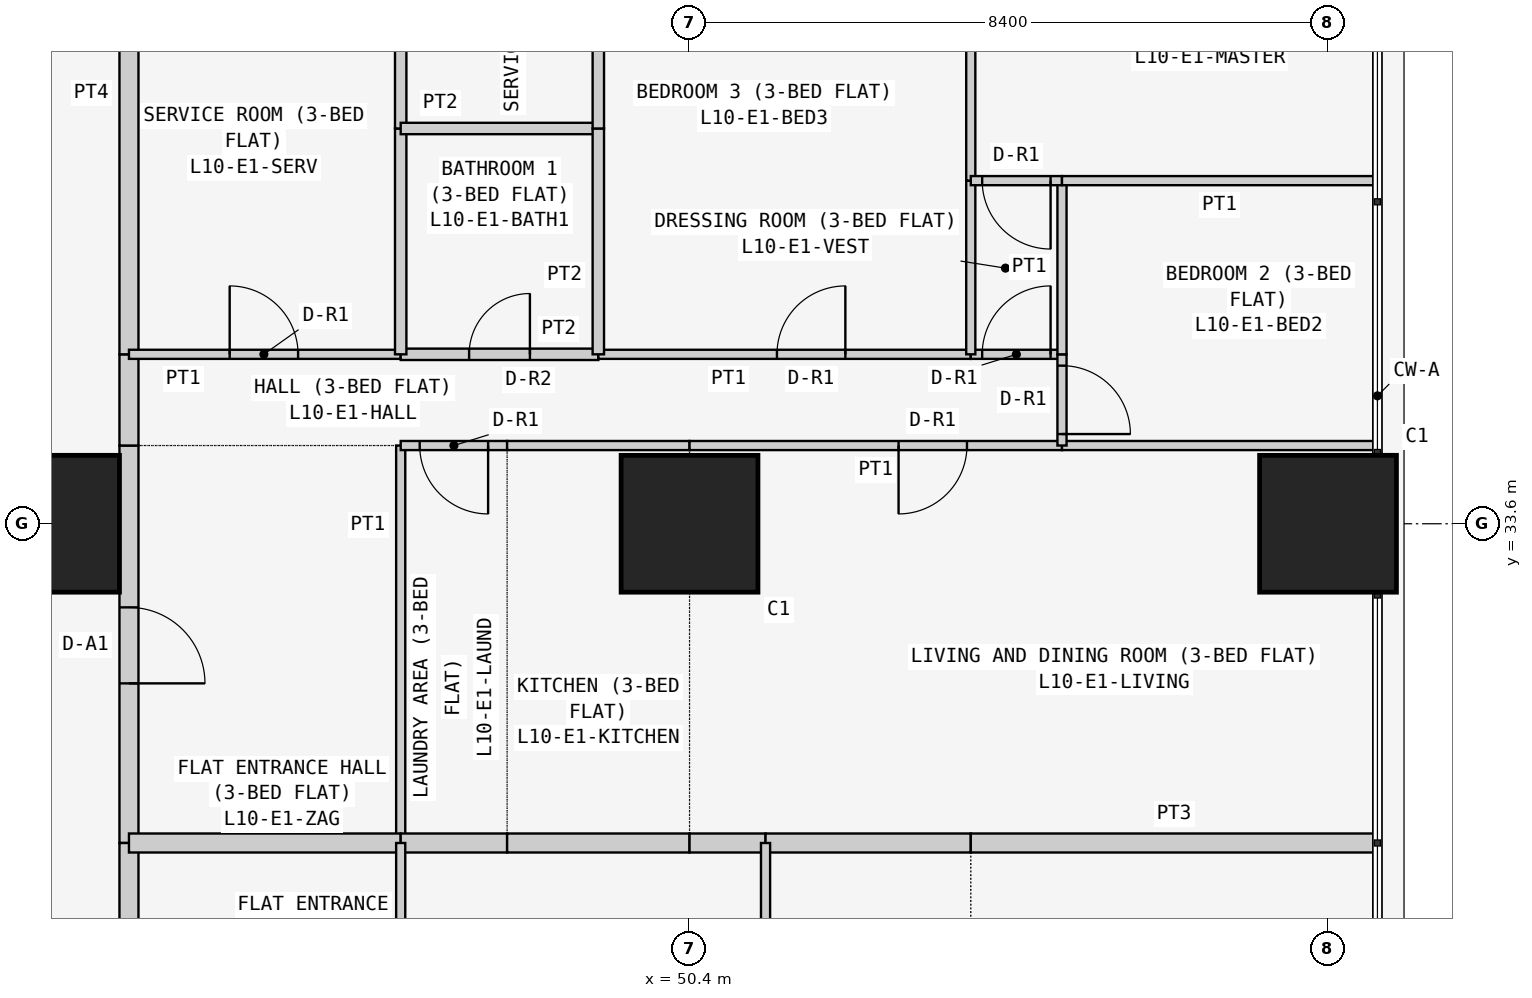
"""IFC4 building model, lengths in metres.
Left out: names, types, materials, properties, quantities, classifications, styles, units other than length and angle.
Written with IfcOpenShell. Run it as: python <this file> out.ifc"""

import sys

from ifc_helpers import new_model, si_unit, direction, frame, frame_2d, origin, origin_2d, place, context, subcontext, project, spatial, rectangle, extrude, element, fill, save


model = new_model("IFC4")
c1 = context("Model", 3, precision=1e-05, world=origin(), true_north=direction((0.0, 1.0)))
c2 = subcontext(c1, "Body", "Model", "MODEL_VIEW")
j1 = project(units=[si_unit("LENGTHUNIT", "METRE"), si_unit("PLANEANGLEUNIT", "RADIAN")], contexts=[c1])
p1 = place(None, origin())
s1 = spatial("IfcSite", under=j1, at=p1, CompositionType="ELEMENT")
p2 = place(p1, origin())
s2 = spatial("IfcBuilding", under=s1, at=p2, CompositionType="ELEMENT")
p3 = place(p2, frame((0.0, 0.0, 45.3)))
s3 = spatial("IfcBuildingStorey", under=s2, at=p3, CompositionType="ELEMENT", Elevation=45.3)
for number, where, z_axis, x_axis in (
    (1, (42.0, 33.6, 0.0), (0.0, 0.0, 1.0), (1.0, 0.0, 0.0)),
    (2, (50.4, 33.6, 0.0), (0.0, 0.0, 1.0), (1.0, 0.0, 0.0)),
    (3, (58.8, 33.6, 0.0), (0.0, 0.0, 1.0), (1.0, 0.0, 0.0)),
):
    element("IfcColumn", number, at=place(p3, frame(where, z_axis=z_axis, x_axis=x_axis)), inside=s3, PredefinedType="COLUMN", context=c2, shape_type="SweptSolid", body=[
        extrude(rectangle(XDim=1.8, YDim=1.8, at=origin_2d()), origin(), (0.0, 0.0, 1.0), 3.6),
    ])
p4 = place(p3, frame((43.025, 34.629, 0.0), z_axis=(0.0, 0.0, 1.0), x_axis=(0.0, -1.0, 0.0)))
e4 = element("IfcWall", 4, at=p4, inside=s3, PredefinedType="PARTITIONING", context=c2, shape_type="SweptSolid", body=[
    extrude(rectangle(XDim=5.229, YDim=0.25, at=frame_2d((2.615, 0.0))), origin(), (0.0, 0.0, 1.0), 3.45),
])
p5 = place(p4, frame((2.129, 0.0, 0.0)))
e5 = element("IfcOpeningElement", 5, at=p5, cuts=e4, PredefinedType="OPENING", context=c2, shape_type="SweptSolid", body=[
    extrude(rectangle(XDim=1.0, YDim=2.1, at=frame_2d((0.5, 1.05))), frame((0.0, 0.135, 0.0), z_axis=(0.0, -1.0, 0.0), x_axis=(1.0, 0.0, 0.0)), (0.0, 0.0, 1.0), 0.27),
])
p6 = place(p3, frame((43.025, 35.829, 0.0), z_axis=(0.0, 0.0, 1.0), x_axis=(0.0, -1.0, 0.0)))
e6 = element("IfcWall", 6, at=p6, inside=s3, PredefinedType="PARTITIONING", context=c2, shape_type="SweptSolid", body=[
    extrude(rectangle(XDim=1.2, YDim=0.25, at=frame_2d((0.6, 0.0))), origin(), (0.0, 0.0, 1.0), 3.45),
])
p7 = place(p3, frame((43.025, 42.7, 0.0), z_axis=(0.0, 0.0, 1.0), x_axis=(0.0, -1.0, 0.0)))
e7 = element("IfcWall", 7, at=p7, inside=s3, PredefinedType="PARTITIONING", context=c2, shape_type="SweptSolid", body=[
    extrude(rectangle(XDim=6.871, YDim=0.25, at=frame_2d((3.436, 0.0))), origin(), (0.0, 0.0, 1.0), 3.45),
])
p8 = place(p3, frame((43.025, 29.4, 0.0), z_axis=(0.0, 0.0, 1.0), x_axis=(0.0, -1.0, 0.0)))
e8 = element("IfcWall", 8, at=p8, inside=s3, PredefinedType="PARTITIONING", context=c2, shape_type="SweptSolid", body=[
    extrude(rectangle(XDim=5.229, YDim=0.25, at=frame_2d((2.615, 0.0))), origin(), (0.0, 0.0, 1.0), 3.45),
])
p9 = place(p8, frame((2.1, 0.0, 0.0)))
e9 = element("IfcOpeningElement", 9, at=p9, cuts=e8, PredefinedType="OPENING", context=c2, shape_type="SweptSolid", body=[
    extrude(rectangle(XDim=1.0, YDim=2.1, at=frame_2d((0.5, 1.05))), frame((0.0, 0.135, 0.0), z_axis=(0.0, -1.0, 0.0), x_axis=(1.0, 0.0, 0.0)), (0.0, 0.0, 1.0), 0.27),
])
p10 = place(p3, frame((46.6, 29.4, 0.0), z_axis=(0.0, 0.0, 1.0), x_axis=(0.0, 1.0, 0.0)))
e10 = element("IfcWall", 10, at=p10, inside=s3, PredefinedType="PARTITIONING", context=c2, shape_type="SweptSolid", body=[
    extrude(rectangle(XDim=5.229, YDim=0.12, at=frame_2d((2.615, 0.0))), origin(), (0.0, 0.0, 1.0), 3.45),
])
p11 = place(p3, frame((43.025, 29.4, 0.0), z_axis=(0.0, 0.0, 1.0), x_axis=(1.0, 0.0, 0.0)))
e11 = element("IfcWall", 11, at=p11, inside=s3, PredefinedType="PARTITIONING", context=c2, shape_type="SweptSolid", body=[
    extrude(rectangle(XDim=3.575, YDim=0.25, at=frame_2d((1.788, 0.0))), origin(), (0.0, 0.0, 1.0), 3.45),
])
p12 = place(p3, frame((48.0, 34.629, 0.0), z_axis=(0.0, 0.0, 1.0), x_axis=(-1.0, 0.0, 0.0)))
e12 = element("IfcWall", 12, at=p12, inside=s3, PredefinedType="PARTITIONING", context=c2, shape_type="SweptSolid", body=[
    extrude(rectangle(XDim=1.4, YDim=0.12, at=frame_2d((0.7, 0.0))), origin(), (0.0, 0.0, 1.0), 3.45),
])
p13 = place(p12, frame((0.25, 0.0, 0.0)))
e13 = element("IfcOpeningElement", 13, at=p13, cuts=e12, PredefinedType="OPENING", context=c2, shape_type="SweptSolid", body=[
    extrude(rectangle(XDim=0.9, YDim=2.1, at=frame_2d((0.45, 1.05))), frame((0.0, 0.07, 0.0), z_axis=(0.0, -1.0, 0.0), x_axis=(1.0, 0.0, 0.0)), (0.0, 0.0, 1.0), 0.14),
])
p14 = place(p3, frame((46.6, 29.4, 0.0), z_axis=(0.0, 0.0, 1.0), x_axis=(1.0, 0.0, 0.0)))
e14 = element("IfcWall", 14, at=p14, inside=s3, PredefinedType="PARTITIONING", context=c2, shape_type="SweptSolid", body=[
    extrude(rectangle(XDim=1.4, YDim=0.25, at=frame_2d((0.7, 0.0))), origin(), (0.0, 0.0, 1.0), 3.45),
])
p15 = place(p3, frame((50.4, 34.629, 0.0), z_axis=(0.0, 0.0, 1.0), x_axis=(-1.0, 0.0, 0.0)))
e15 = element("IfcWall", 15, at=p15, inside=s3, PredefinedType="PARTITIONING", context=c2, shape_type="SweptSolid", body=[
    extrude(rectangle(XDim=2.4, YDim=0.12, at=frame_2d((1.2, 0.0))), origin(), (0.0, 0.0, 1.0), 3.45),
])
p16 = place(p3, frame((48.0, 29.4, 0.0), z_axis=(0.0, 0.0, 1.0), x_axis=(1.0, 0.0, 0.0)))
e16 = element("IfcWall", 16, at=p16, inside=s3, PredefinedType="PARTITIONING", context=c2, shape_type="SweptSolid", body=[
    extrude(rectangle(XDim=2.4, YDim=0.25, at=frame_2d((1.2, 0.0))), origin(), (0.0, 0.0, 1.0), 3.45),
])
p17 = place(p3, frame((55.3, 34.629, 0.0), z_axis=(0.0, 0.0, 1.0), x_axis=(-1.0, 0.0, 0.0)))
e17 = element("IfcWall", 17, at=p17, inside=s3, PredefinedType="PARTITIONING", context=c2, shape_type="SweptSolid", body=[
    extrude(rectangle(XDim=4.9, YDim=0.12, at=frame_2d((2.45, 0.0))), origin(), (0.0, 0.0, 1.0), 3.45),
])
p18 = place(p17, frame((1.25, 0.0, 0.0)))
e18 = element("IfcOpeningElement", 18, at=p18, cuts=e17, PredefinedType="OPENING", context=c2, shape_type="SweptSolid", body=[
    extrude(rectangle(XDim=0.9, YDim=2.1, at=frame_2d((0.45, 1.05))), frame((0.0, 0.07, 0.0), z_axis=(0.0, -1.0, 0.0), x_axis=(1.0, 0.0, 0.0)), (0.0, 0.0, 1.0), 0.14),
])
p19 = place(p3, frame((59.45, 34.629, 0.0), z_axis=(0.0, 0.0, 1.0), x_axis=(-1.0, 0.0, 0.0)))
e19 = element("IfcWall", 19, at=p19, inside=s3, PredefinedType="PARTITIONING", context=c2, shape_type="SweptSolid", body=[
    extrude(rectangle(XDim=4.15, YDim=0.12, at=frame_2d((2.075, 0.0))), origin(), (0.0, 0.0, 1.0), 3.45),
])
p20 = place(p3, frame((50.4, 29.4, 0.0), z_axis=(0.0, 0.0, 1.0), x_axis=(1.0, 0.0, 0.0)))
e20 = element("IfcWall", 20, at=p20, inside=s3, PredefinedType="PARTITIONING", context=c2, shape_type="SweptSolid", body=[
    extrude(rectangle(XDim=1.0, YDim=0.25, at=frame_2d((0.5, 0.0))), origin(), (0.0, 0.0, 1.0), 3.45),
])
p21 = place(p3, frame((51.4, 29.4, 0.0), z_axis=(0.0, 0.0, 1.0), x_axis=(1.0, 0.0, 0.0)))
e21 = element("IfcWall", 21, at=p21, inside=s3, PredefinedType="PARTITIONING", context=c2, shape_type="SweptSolid", body=[
    extrude(rectangle(XDim=2.7, YDim=0.25, at=frame_2d((1.35, 0.0))), origin(), (0.0, 0.0, 1.0), 3.45),
])
p22 = place(p3, frame((54.1, 29.4, 0.0), z_axis=(0.0, 0.0, 1.0), x_axis=(1.0, 0.0, 0.0)))
e22 = element("IfcWall", 22, at=p22, inside=s3, PredefinedType="PARTITIONING", context=c2, shape_type="SweptSolid", body=[
    extrude(rectangle(XDim=5.35, YDim=0.25, at=frame_2d((2.675, 0.0))), origin(), (0.0, 0.0, 1.0), 3.45),
])
p23 = place(p3, frame((46.6, 35.829, 0.0), z_axis=(0.0, 0.0, 1.0), x_axis=(-1.0, 0.0, 0.0)))
e23 = element("IfcWall", 23, at=p23, inside=s3, PredefinedType="PARTITIONING", context=c2, shape_type="SweptSolid", body=[
    extrude(rectangle(XDim=3.575, YDim=0.12, at=frame_2d((1.788, 0.0))), origin(), (0.0, 0.0, 1.0), 3.45),
])
p24 = place(p23, frame((1.35, 0.0, 0.0)))
e24 = element("IfcOpeningElement", 24, at=p24, cuts=e23, PredefinedType="OPENING", context=c2, shape_type="SweptSolid", body=[
    extrude(rectangle(XDim=0.9, YDim=2.1, at=frame_2d((0.45, 1.05))), frame((0.0, 0.07, 0.0), z_axis=(0.0, -1.0, 0.0), x_axis=(1.0, 0.0, 0.0)), (0.0, 0.0, 1.0), 0.14),
])
p25 = place(p3, frame((49.2, 35.829, 0.0), z_axis=(0.0, 0.0, 1.0), x_axis=(-1.0, 0.0, 0.0)))
e25 = element("IfcWall", 25, at=p25, inside=s3, PredefinedType="PARTITIONING", context=c2, shape_type="SweptSolid", body=[
    extrude(rectangle(XDim=2.6, YDim=0.15, at=frame_2d((1.3, 0.0))), origin(), (0.0, 0.0, 1.0), 3.45),
])
p26 = place(p25, frame((0.9, 0.0, 0.0)))
e26 = element("IfcOpeningElement", 26, at=p26, cuts=e25, PredefinedType="OPENING", context=c2, shape_type="SweptSolid", body=[
    extrude(rectangle(XDim=0.8, YDim=2.1, at=frame_2d((0.4, 1.05))), frame((0.0, 0.085, 0.0), z_axis=(0.0, -1.0, 0.0), x_axis=(1.0, 0.0, 0.0)), (0.0, 0.0, 1.0), 0.17),
])
p27 = place(p3, frame((54.1, 35.829, 0.0), z_axis=(0.0, 0.0, 1.0), x_axis=(-1.0, 0.0, 0.0)))
e27 = element("IfcWall", 27, at=p27, inside=s3, PredefinedType="PARTITIONING", context=c2, shape_type="SweptSolid", body=[
    extrude(rectangle(XDim=4.9, YDim=0.12, at=frame_2d((2.45, 0.0))), origin(), (0.0, 0.0, 1.0), 3.45),
])
p28 = place(p27, frame((1.65, 0.0, 0.0)))
e28 = element("IfcOpeningElement", 28, at=p28, cuts=e27, PredefinedType="OPENING", context=c2, shape_type="SweptSolid", body=[
    extrude(rectangle(XDim=0.9, YDim=2.1, at=frame_2d((0.45, 1.05))), frame((0.0, 0.07, 0.0), z_axis=(0.0, -1.0, 0.0), x_axis=(1.0, 0.0, 0.0)), (0.0, 0.0, 1.0), 0.14),
])
p29 = place(p3, frame((55.3, 35.829, 0.0), z_axis=(0.0, 0.0, 1.0), x_axis=(-1.0, 0.0, 0.0)))
e29 = element("IfcWall", 29, at=p29, inside=s3, PredefinedType="PARTITIONING", context=c2, shape_type="SweptSolid", body=[
    extrude(rectangle(XDim=1.2, YDim=0.12, at=frame_2d((0.6, 0.0))), origin(), (0.0, 0.0, 1.0), 3.45),
])
p30 = place(p29, frame((0.15, 0.0, 0.0)))
e30 = element("IfcOpeningElement", 30, at=p30, cuts=e29, PredefinedType="OPENING", context=c2, shape_type="SweptSolid", body=[
    extrude(rectangle(XDim=0.9, YDim=2.1, at=frame_2d((0.45, 1.05))), frame((0.0, 0.07, 0.0), z_axis=(0.0, -1.0, 0.0), x_axis=(1.0, 0.0, 0.0)), (0.0, 0.0, 1.0), 0.14),
])
p31 = place(p3, frame((55.3, 34.629, 0.0), z_axis=(0.0, 0.0, 1.0), x_axis=(0.0, 1.0, 0.0)))
e31 = element("IfcWall", 31, at=p31, inside=s3, PredefinedType="PARTITIONING", context=c2, shape_type="SweptSolid", body=[
    extrude(rectangle(XDim=1.2, YDim=0.12, at=frame_2d((0.6, 0.0))), origin(), (0.0, 0.0, 1.0), 3.45),
])
p32 = place(p31, frame((0.151, 0.0, 0.0)))
e32 = element("IfcOpeningElement", 32, at=p32, cuts=e31, PredefinedType="OPENING", context=c2, shape_type="SweptSolid", body=[
    extrude(rectangle(XDim=0.9, YDim=2.1, at=frame_2d((0.45, 1.05))), frame((0.0, 0.07, 0.0), z_axis=(0.0, -1.0, 0.0), x_axis=(1.0, 0.0, 0.0)), (0.0, 0.0, 1.0), 0.14),
])
p33 = place(p3, frame((46.6, 35.829, 0.0), z_axis=(0.0, 0.0, 1.0), x_axis=(0.0, 1.0, 0.0)))
e33 = element("IfcWall", 33, at=p33, inside=s3, PredefinedType="PARTITIONING", context=c2, shape_type="SweptSolid", body=[
    extrude(rectangle(XDim=2.971, YDim=0.15, at=frame_2d((1.485, 0.0))), origin(), (0.0, 0.0, 1.0), 3.45),
])
p34 = place(p3, frame((46.6, 38.8, 0.0), z_axis=(0.0, 0.0, 1.0), x_axis=(0.0, 1.0, 0.0)))
e34 = element("IfcWall", 34, at=p34, inside=s3, PredefinedType="PARTITIONING", context=c2, shape_type="SweptSolid", body=[
    extrude(rectangle(XDim=3.9, YDim=0.15, at=frame_2d((1.95, 0.0))), origin(), (0.0, 0.0, 1.0), 3.45),
])
p35 = place(p34, frame((1.45, 0.0, 0.0)))
e35 = element("IfcOpeningElement", 35, at=p35, cuts=e34, PredefinedType="OPENING", context=c2, shape_type="SweptSolid", body=[
    extrude(rectangle(XDim=0.8, YDim=2.1, at=frame_2d((0.4, 1.05))), frame((0.0, 0.085, 0.0), z_axis=(0.0, -1.0, 0.0), x_axis=(1.0, 0.0, 0.0)), (0.0, 0.0, 1.0), 0.17),
])
p36 = place(p3, frame((49.2, 38.8, 0.0), z_axis=(0.0, 0.0, 1.0), x_axis=(-1.0, 0.0, 0.0)))
e36 = element("IfcWall", 36, at=p36, inside=s3, PredefinedType="PARTITIONING", context=c2, shape_type="SweptSolid", body=[
    extrude(rectangle(XDim=2.6, YDim=0.15, at=frame_2d((1.3, 0.0))), origin(), (0.0, 0.0, 1.0), 3.45),
])
p37 = place(p3, frame((49.2, 35.829, 0.0), z_axis=(0.0, 0.0, 1.0), x_axis=(0.0, 1.0, 0.0)))
e37 = element("IfcWall", 37, at=p37, inside=s3, PredefinedType="PARTITIONING", context=c2, shape_type="SweptSolid", body=[
    extrude(rectangle(XDim=2.971, YDim=0.15, at=frame_2d((1.485, 0.0))), origin(), (0.0, 0.0, 1.0), 3.45),
])
p38 = place(p3, frame((49.2, 38.8, 0.0), z_axis=(0.0, 0.0, 1.0), x_axis=(0.0, 1.0, 0.0)))
e38 = element("IfcWall", 38, at=p38, inside=s3, PredefinedType="PARTITIONING", context=c2, shape_type="SweptSolid", body=[
    extrude(rectangle(XDim=3.9, YDim=0.15, at=frame_2d((1.95, 0.0))), origin(), (0.0, 0.0, 1.0), 3.45),
])
p39 = place(p3, frame((54.1, 35.829, 0.0), z_axis=(0.0, 0.0, 1.0), x_axis=(0.0, 1.0, 0.0)))
e39 = element("IfcWall", 39, at=p39, inside=s3, PredefinedType="PARTITIONING", context=c2, shape_type="SweptSolid", body=[
    extrude(rectangle(XDim=2.285, YDim=0.12, at=frame_2d((1.143, 0.0))), origin(), (0.0, 0.0, 1.0), 3.45),
])
p40 = place(p3, frame((54.1, 38.114, 0.0), z_axis=(0.0, 0.0, 1.0), x_axis=(0.0, 1.0, 0.0)))
e40 = element("IfcWall", 40, at=p40, inside=s3, PredefinedType="PARTITIONING", context=c2, shape_type="SweptSolid", body=[
    extrude(rectangle(XDim=4.586, YDim=0.12, at=frame_2d((2.293, 0.0))), origin(), (0.0, 0.0, 1.0), 3.45),
])
p41 = place(p3, frame((55.3, 35.829, 0.0), z_axis=(0.0, 0.0, 1.0), x_axis=(0.0, 1.0, 0.0)))
e41 = element("IfcWall", 41, at=p41, inside=s3, PredefinedType="PARTITIONING", context=c2, shape_type="SweptSolid", body=[
    extrude(rectangle(XDim=2.285, YDim=0.12, at=frame_2d((1.143, 0.0))), origin(), (0.0, 0.0, 1.0), 3.45),
])
p42 = place(p3, frame((55.3, 38.114, 0.0), z_axis=(0.0, 0.0, 1.0), x_axis=(-1.0, 0.0, 0.0)))
e42 = element("IfcWall", 42, at=p42, inside=s3, PredefinedType="PARTITIONING", context=c2, shape_type="SweptSolid", body=[
    extrude(rectangle(XDim=1.2, YDim=0.12, at=frame_2d((0.6, 0.0))), origin(), (0.0, 0.0, 1.0), 3.45),
])
p43 = place(p42, frame((0.15, 0.0, 0.0)))
e43 = element("IfcOpeningElement", 43, at=p43, cuts=e42, PredefinedType="OPENING", context=c2, shape_type="SweptSolid", body=[
    extrude(rectangle(XDim=0.9, YDim=2.1, at=frame_2d((0.45, 1.05))), frame((0.0, 0.07, 0.0), z_axis=(0.0, -1.0, 0.0), x_axis=(1.0, 0.0, 0.0)), (0.0, 0.0, 1.0), 0.14),
])
p44 = place(p3, frame((59.45, 38.114, 0.0), z_axis=(0.0, 0.0, 1.0), x_axis=(-1.0, 0.0, 0.0)))
e44 = element("IfcWall", 44, at=p44, inside=s3, PredefinedType="PARTITIONING", context=c2, shape_type="SweptSolid", body=[
    extrude(rectangle(XDim=4.15, YDim=0.12, at=frame_2d((2.075, 0.0))), origin(), (0.0, 0.0, 1.0), 3.45),
])
for number, where, z_axis, x_axis in (
    (45, (46.6, 29.4, 0.0), (0.0, 0.0, 1.0), (0.0, -1.0, 0.0)),
    (46, (51.4, 29.4, 0.0), (0.0, 0.0, 1.0), (0.0, -1.0, 0.0)),
):
    element("IfcWall", number, at=place(p3, frame(where, z_axis=z_axis, x_axis=x_axis)), inside=s3, PredefinedType="PARTITIONING", context=c2, shape_type="SweptSolid", body=[
        extrude(rectangle(XDim=5.229, YDim=0.12, at=frame_2d((2.615, 0.0))), origin(), (0.0, 0.0, 1.0), 3.45),
    ])
p45 = place(p5, origin())
e47 = element("IfcDoor", 47, at=p45, inside=s3, OperationType="SINGLE_SWING_RIGHT", PredefinedType="DOOR", context=c2, shape_type="SweptSolid", body=[
    extrude(rectangle(XDim=1.0, YDim=2.1, at=frame_2d((0.5, 1.05))), frame((0.0, 0.025, 0.0), z_axis=(0.0, -1.0, 0.0), x_axis=(1.0, 0.0, 0.0)), (0.0, 0.0, 1.0), 0.05),
])
fill(e5, e47)
p46 = place(p13, origin())
e48 = element("IfcDoor", 48, at=p46, inside=s3, OperationType="SINGLE_SWING_LEFT", PredefinedType="DOOR", context=c2, shape_type="SweptSolid", body=[
    extrude(rectangle(XDim=0.9, YDim=2.1, at=frame_2d((0.45, 1.05))), frame((0.0, 0.025, 0.0), z_axis=(0.0, -1.0, 0.0), x_axis=(1.0, 0.0, 0.0)), (0.0, 0.0, 1.0), 0.05),
])
fill(e13, e48)
p47 = place(p18, origin())
e49 = element("IfcDoor", 49, at=p47, inside=s3, OperationType="SINGLE_SWING_RIGHT", PredefinedType="DOOR", context=c2, shape_type="SweptSolid", body=[
    extrude(rectangle(XDim=0.9, YDim=2.1, at=frame_2d((0.45, 1.05))), frame((0.0, 0.025, 0.0), z_axis=(0.0, -1.0, 0.0), x_axis=(1.0, 0.0, 0.0)), (0.0, 0.0, 1.0), 0.05),
])
fill(e18, e49)
p48 = place(p24, frame((0.9, 0.0, 0.0), z_axis=(0.0, 0.0, 1.0), x_axis=(-1.0, 0.0, 0.0)))
e50 = element("IfcDoor", 50, at=p48, inside=s3, OperationType="SINGLE_SWING_LEFT", PredefinedType="DOOR", context=c2, shape_type="SweptSolid", body=[
    extrude(rectangle(XDim=0.9, YDim=2.1, at=frame_2d((0.45, 1.05))), frame((0.0, 0.025, 0.0), z_axis=(0.0, -1.0, 0.0), x_axis=(1.0, 0.0, 0.0)), (0.0, 0.0, 1.0), 0.05),
])
fill(e24, e50)
p49 = place(p26, frame((0.8, 0.0, 0.0), z_axis=(0.0, 0.0, 1.0), x_axis=(-1.0, 0.0, 0.0)))
e51 = element("IfcDoor", 51, at=p49, inside=s3, OperationType="SINGLE_SWING_RIGHT", PredefinedType="DOOR", context=c2, shape_type="SweptSolid", body=[
    extrude(rectangle(XDim=0.8, YDim=2.1, at=frame_2d((0.4, 1.05))), frame((0.0, 0.025, 0.0), z_axis=(0.0, -1.0, 0.0), x_axis=(1.0, 0.0, 0.0)), (0.0, 0.0, 1.0), 0.05),
])
fill(e26, e51)
p50 = place(p28, frame((0.9, 0.0, 0.0), z_axis=(0.0, 0.0, 1.0), x_axis=(-1.0, 0.0, 0.0)))
e52 = element("IfcDoor", 52, at=p50, inside=s3, OperationType="SINGLE_SWING_RIGHT", PredefinedType="DOOR", context=c2, shape_type="SweptSolid", body=[
    extrude(rectangle(XDim=0.9, YDim=2.1, at=frame_2d((0.45, 1.05))), frame((0.0, 0.025, 0.0), z_axis=(0.0, -1.0, 0.0), x_axis=(1.0, 0.0, 0.0)), (0.0, 0.0, 1.0), 0.05),
])
fill(e28, e52)
p51 = place(p30, frame((0.9, 0.0, 0.0), z_axis=(0.0, 0.0, 1.0), x_axis=(-1.0, 0.0, 0.0)))
e53 = element("IfcDoor", 53, at=p51, inside=s3, OperationType="SINGLE_SWING_RIGHT", PredefinedType="DOOR", context=c2, shape_type="SweptSolid", body=[
    extrude(rectangle(XDim=0.9, YDim=2.1, at=frame_2d((0.45, 1.05))), frame((0.0, 0.025, 0.0), z_axis=(0.0, -1.0, 0.0), x_axis=(1.0, 0.0, 0.0)), (0.0, 0.0, 1.0), 0.05),
])
fill(e30, e53)
p52 = place(p43, origin())
e54 = element("IfcDoor", 54, at=p52, inside=s3, OperationType="SINGLE_SWING_LEFT", PredefinedType="DOOR", context=c2, shape_type="SweptSolid", body=[
    extrude(rectangle(XDim=0.9, YDim=2.1, at=frame_2d((0.45, 1.05))), frame((0.0, 0.025, 0.0), z_axis=(0.0, -1.0, 0.0), x_axis=(1.0, 0.0, 0.0)), (0.0, 0.0, 1.0), 0.05),
])
fill(e43, e54)
p53 = place(p32, frame((0.9, 0.0, 0.0), z_axis=(0.0, 0.0, 1.0), x_axis=(-1.0, 0.0, 0.0)))
e55 = element("IfcDoor", 55, at=p53, inside=s3, OperationType="SINGLE_SWING_RIGHT", PredefinedType="DOOR", context=c2, shape_type="SweptSolid", body=[
    extrude(rectangle(XDim=0.9, YDim=2.1, at=frame_2d((0.45, 1.05))), frame((0.0, 0.025, 0.0), z_axis=(0.0, -1.0, 0.0), x_axis=(1.0, 0.0, 0.0)), (0.0, 0.0, 1.0), 0.05),
])
fill(e32, e55)
save(model, sys.argv[1])
